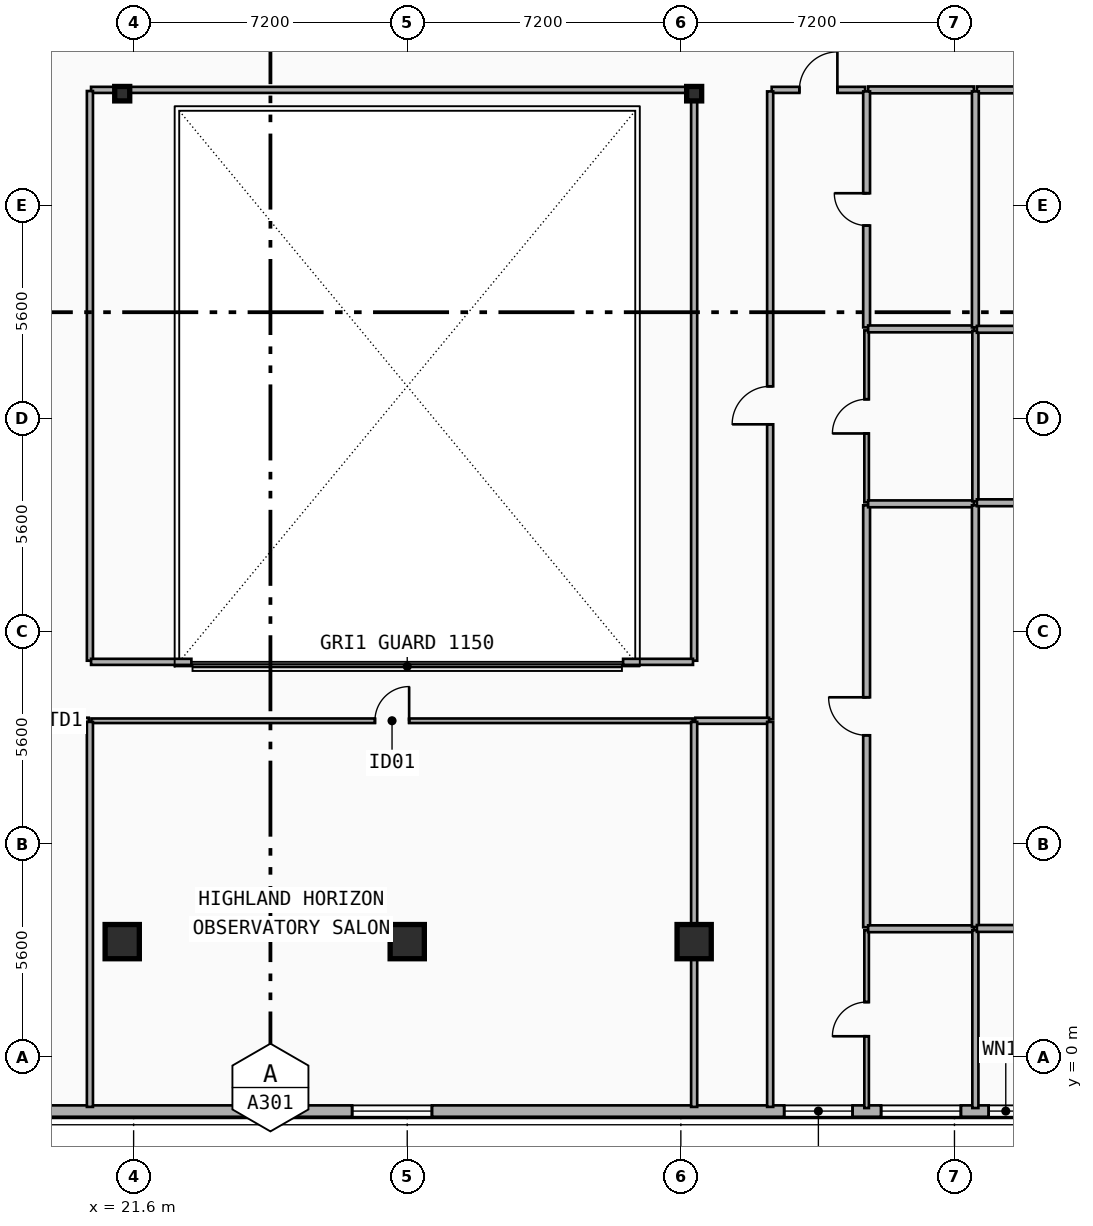
"""IFC4 building model, lengths in metres.
Left out: names, types, materials, properties, quantities, classifications, styles, units other than length and angle.
Written with IfcOpenShell. Run it as: python <this file> out.ifc"""

import sys

from ifc_helpers import new_model, si_unit, direction, frame, frame_2d, origin, origin_2d, place, context, subcontext, project, spatial, rectangle, i_section, extrude, element, fill, save


model = new_model("IFC4")
c1 = context("Model", 3, precision=1e-05, world=origin(), true_north=direction((0.0, 1.0)))
c2 = subcontext(c1, "Body", "Model", "MODEL_VIEW")
j1 = project(units=[si_unit("LENGTHUNIT", "METRE"), si_unit("PLANEANGLEUNIT", "RADIAN")], contexts=[c1])
p1 = place(None, origin())
s1 = spatial("IfcSite", under=j1, at=p1, CompositionType="ELEMENT")
p2 = place(p1, origin())
s2 = spatial("IfcBuilding", under=s1, at=p2, CompositionType="ELEMENT")
p3 = place(p2, frame((0.0, 0.0, 254.7)))
s3 = spatial("IfcBuildingStorey", under=s2, at=p3, CompositionType="ELEMENT", Elevation=254.7)
for number, where, z_axis, x_axis in (
    (1, (21.3, 25.35, 0.0), (0.0, 0.0, 1.0), (1.0, 0.0, 0.0)),
    (2, (36.35, 25.35, 0.0), (0.0, 0.0, 1.0), (1.0, 0.0, 0.0)),
):
    element("IfcColumn", number, at=place(p3, frame(where, z_axis=z_axis, x_axis=x_axis)), inside=s3, PredefinedType="COLUMN", context=c2, shape_type="SweptSolid", body=[
        extrude(i_section(OverallWidth=0.395, OverallDepth=0.38, WebThickness=0.019, FlangeThickness=0.03, FilletRadius=0.015, at=origin_2d()), origin(), (0.0, 0.0, 1.0), 3.7),
    ])
for number, where, z_axis, x_axis in (
    (3, (21.3, 3.147, 0.0), (0.0, -0.09, 0.996), (1.0, 0.0, 0.0)),
    (4, (28.8, 3.147, 0.0), (0.0, -0.09, 0.996), (1.0, 0.0, 0.0)),
    (5, (36.35, 3.147, 0.0), (0.0, -0.09, 0.996), (1.0, 0.0, 0.0)),
):
    element("IfcColumn", number, at=place(p3, frame(where, z_axis=z_axis, x_axis=x_axis)), inside=s3, PredefinedType="COLUMN", context=c2, shape_type="SweptSolid", body=[
        extrude(rectangle(XDim=0.9, YDim=0.9, at=origin_2d()), origin(), (0.0, 0.0, 1.0), 3.715),
    ])
p4 = place(p3, frame((45.2, -1.42, 0.0), z_axis=(0.0, 0.0, 1.0), x_axis=(-1.0, 0.0, 0.0)))
e6 = element("IfcWall", 6, at=p4, inside=s3, PredefinedType="SOLIDWALL", context=c2, shape_type="SweptSolid", body=[
    extrude(rectangle(XDim=32.8, YDim=0.3, at=frame_2d((16.4, 0.0))), origin(), (0.0, 0.0, 1.0), 3.42),
])
p5 = place(p4, frame((26.77, 0.0, 0.75)))
e7 = element("IfcOpeningElement", 7, at=p5, cuts=e6, PredefinedType="OPENING", context=c2, shape_type="SweptSolid", body=[
    extrude(rectangle(XDim=1.6, YDim=1.95, at=frame_2d((0.8, 0.975))), frame((0.0, 0.16, 0.0), z_axis=(0.0, -1.0, 0.0), x_axis=(1.0, 0.0, 0.0)), (0.0, 0.0, 1.0), 0.32),
])
p6 = place(p4, frame((29.115, 0.0, 0.75)))
e8 = element("IfcOpeningElement", 8, at=p6, cuts=e6, PredefinedType="OPENING", context=c2, shape_type="SweptSolid", body=[
    extrude(rectangle(XDim=2.1, YDim=2.1, at=frame_2d((1.05, 1.05))), frame((0.0, 0.16, 0.0), z_axis=(0.0, -1.0, 0.0), x_axis=(1.0, 0.0, 0.0)), (0.0, 0.0, 1.0), 0.32),
])
p7 = place(p4, frame((15.75, 0.0, 0.75)))
e9 = element("IfcOpeningElement", 9, at=p7, cuts=e6, PredefinedType="OPENING", context=c2, shape_type="SweptSolid", body=[
    extrude(rectangle(XDim=2.1, YDim=2.1, at=frame_2d((1.05, 1.05))), frame((0.0, 0.16, 0.0), z_axis=(0.0, -1.0, 0.0), x_axis=(1.0, 0.0, 0.0)), (0.0, 0.0, 1.0), 0.32),
])
p8 = place(p4, frame((4.681, 0.0, 0.8)))
e10 = element("IfcOpeningElement", 10, at=p8, cuts=e6, PredefinedType="OPENING", context=c2, shape_type="SweptSolid", body=[
    extrude(rectangle(XDim=1.8, YDim=1.8, at=frame_2d((0.9, 0.9))), frame((0.0, 0.16, 0.0), z_axis=(0.0, -1.0, 0.0), x_axis=(1.0, 0.0, 0.0)), (0.0, 0.0, 1.0), 0.32),
])
p9 = place(p4, frame((1.831, 0.0, 0.75)))
e11 = element("IfcOpeningElement", 11, at=p9, cuts=e6, PredefinedType="OPENING", context=c2, shape_type="SweptSolid", body=[
    extrude(rectangle(XDim=2.1, YDim=2.1, at=frame_2d((1.05, 1.05))), frame((0.0, 0.16, 0.0), z_axis=(0.0, -1.0, 0.0), x_axis=(1.0, 0.0, 0.0)), (0.0, 0.0, 1.0), 0.32),
])
p10 = place(p4, frame((0.2, 0.0, 0.9)))
e12 = element("IfcOpeningElement", 12, at=p10, cuts=e6, PredefinedType="OPENING", context=c2, shape_type="SweptSolid", body=[
    extrude(rectangle(XDim=0.9, YDim=1.05, at=frame_2d((0.45, 0.525))), frame((0.0, 0.16, 0.0), z_axis=(0.0, -1.0, 0.0), x_axis=(1.0, 0.0, 0.0)), (0.0, 0.0, 1.0), 0.32),
])
p11 = place(p4, frame((31.76, 0.0, 0.9)))
e13 = element("IfcOpeningElement", 13, at=p11, cuts=e6, PredefinedType="OPENING", context=c2, shape_type="SweptSolid", body=[
    extrude(rectangle(XDim=0.9, YDim=1.05, at=frame_2d((0.45, 0.525))), frame((0.0, 0.16, 0.0), z_axis=(0.0, -1.0, 0.0), x_axis=(1.0, 0.0, 0.0)), (0.0, 0.0, 1.0), 0.32),
])
p12 = place(p3, frame((38.39, 25.45, 0.0), z_axis=(0.0, 0.0, 1.0), x_axis=(1.0, 0.0, 0.0)))
e14 = element("IfcWall", 14, at=p12, inside=s3, PredefinedType="PARTITIONING", context=c2, shape_type="SweptSolid", body=[
    extrude(rectangle(XDim=2.458, YDim=0.16, at=frame_2d((1.229, 0.0))), origin(), (0.0, 0.0, 1.0), 3.42),
])
p13 = place(p12, frame((0.729, 0.0, 0.0)))
e15 = element("IfcOpeningElement", 15, at=p13, cuts=e14, PredefinedType="OPENING", context=c2, shape_type="SweptSolid", body=[
    extrude(rectangle(XDim=1.0, YDim=2.15, at=frame_2d((0.5, 1.075))), frame((0.0, 0.09, 0.0), z_axis=(0.0, -1.0, 0.0), x_axis=(1.0, 0.0, 0.0)), (0.0, 0.0, 1.0), 0.18),
])
p14 = place(p3, frame((40.928, 25.45, 0.0), z_axis=(0.0, 0.0, 1.0), x_axis=(1.0, 0.0, 0.0)))
e16 = element("IfcWall", 16, at=p14, inside=s3, PredefinedType="PLUMBINGWALL", context=c2, shape_type="SweptSolid", body=[
    extrude(rectangle(XDim=2.782, YDim=0.18, at=frame_2d((1.391, 0.0))), origin(), (0.0, 0.0, 1.0), 3.42),
])
p15 = place(p3, frame((43.79, 25.45, 0.0), z_axis=(0.0, 0.0, 1.0), x_axis=(1.0, 0.0, 0.0)))
e17 = element("IfcWall", 17, at=p15, inside=s3, PredefinedType="PLUMBINGWALL", context=c2, shape_type="SweptSolid", body=[
    extrude(rectangle(XDim=2.777, YDim=0.18, at=frame_2d((1.388, 0.0))), origin(), (0.0, 0.0, 1.0), 2.7),
])
p16 = place(p3, frame((38.35, 8.89, 0.0), z_axis=(0.0, 0.0, 1.0), x_axis=(0.0, 1.0, 0.0)))
e18 = element("IfcWall", 18, at=p16, inside=s3, PredefinedType="PARTITIONING", context=c2, shape_type="SweptSolid", body=[
    extrude(rectangle(XDim=16.52, YDim=0.16, at=frame_2d((8.26, 0.0))), origin(), (0.0, 0.0, 1.0), 2.9),
])
p17 = place(p16, frame((7.76, 0.0, 0.0)))
e19 = element("IfcOpeningElement", 19, at=p17, cuts=e18, PredefinedType="OPENING", context=c2, shape_type="SweptSolid", body=[
    extrude(rectangle(XDim=1.0, YDim=2.15, at=frame_2d((0.5, 1.075))), frame((0.0, 0.09, 0.0), z_axis=(0.0, -1.0, 0.0), x_axis=(1.0, 0.0, 0.0)), (0.0, 0.0, 1.0), 0.18),
])
p18 = place(p3, frame((20.49, 8.85, 0.0), z_axis=(0.0, 0.0, 1.0), x_axis=(1.0, 0.0, 0.0)))
e20 = element("IfcWall", 20, at=p18, inside=s3, PredefinedType="PARTITIONING", context=c2, shape_type="SweptSolid", body=[
    extrude(rectangle(XDim=15.82, YDim=0.12, at=frame_2d((7.91, 0.0))), origin(), (0.0, 0.0, 1.0), 2.7),
])
p19 = place(p18, frame((7.46, 0.0, 0.0)))
e21 = element("IfcOpeningElement", 21, at=p19, cuts=e20, PredefinedType="OPENING", context=c2, shape_type="SweptSolid", body=[
    extrude(rectangle(XDim=0.9, YDim=2.1, at=frame_2d((0.45, 1.05))), frame((0.0, 0.07, 0.0), z_axis=(0.0, -1.0, 0.0), x_axis=(1.0, 0.0, 0.0)), (0.0, 0.0, 1.0), 0.14),
])
p20 = place(p3, frame((40.888, -1.34, 0.0), z_axis=(0.0, 0.0, 1.0), x_axis=(0.0, 1.0, 0.0)))
e22 = element("IfcWall", 22, at=p20, inside=s3, PredefinedType="PARTITIONING", context=c2, shape_type="SweptSolid", body=[
    extrude(rectangle(XDim=4.677, YDim=0.12, at=frame_2d((2.338, 0.0))), origin(), (0.0, 0.0, 1.0), 3.08),
])
p21 = place(p20, frame((1.888, 0.0, 0.0)))
e23 = element("IfcOpeningElement", 23, at=p21, cuts=e22, PredefinedType="OPENING", context=c2, shape_type="SweptSolid", body=[
    extrude(rectangle(XDim=0.9, YDim=2.1, at=frame_2d((0.45, 1.05))), frame((0.0, 0.07, 0.0), z_axis=(0.0, -1.0, 0.0), x_axis=(1.0, 0.0, 0.0)), (0.0, 0.0, 1.0), 0.14),
])
p22 = place(p3, frame((40.888, 3.417, 0.0), z_axis=(0.0, 0.0, 1.0), x_axis=(0.0, 1.0, 0.0)))
e24 = element("IfcWall", 24, at=p22, inside=s3, PredefinedType="PLUMBINGWALL", context=c2, shape_type="SweptSolid", body=[
    extrude(rectangle(XDim=11.101, YDim=0.18, at=frame_2d((5.551, 0.0))), origin(), (0.0, 0.0, 1.0), 2.9),
])
p23 = place(p22, frame((5.051, 0.0, 0.0)))
e25 = element("IfcOpeningElement", 25, at=p23, cuts=e24, PredefinedType="OPENING", context=c2, shape_type="SweptSolid", body=[
    extrude(rectangle(XDim=1.0, YDim=2.15, at=frame_2d((0.5, 1.075))), frame((0.0, 0.1, 0.0), z_axis=(0.0, -1.0, 0.0), x_axis=(1.0, 0.0, 0.0)), (0.0, 0.0, 1.0), 0.2),
])
p24 = place(p3, frame((40.888, 14.598, 0.0), z_axis=(0.0, 0.0, 1.0), x_axis=(0.0, 1.0, 0.0)))
e26 = element("IfcWall", 26, at=p24, inside=s3, PredefinedType="PARTITIONING", context=c2, shape_type="SweptSolid", body=[
    extrude(rectangle(XDim=4.523, YDim=0.12, at=frame_2d((2.262, 0.0))), origin(), (0.0, 0.0, 1.0), 2.9),
])
p25 = place(p24, frame((1.812, 0.0, 0.0)))
e27 = element("IfcOpeningElement", 27, at=p25, cuts=e26, PredefinedType="OPENING", context=c2, shape_type="SweptSolid", body=[
    extrude(rectangle(XDim=0.9, YDim=2.1, at=frame_2d((0.45, 1.05))), frame((0.0, 0.07, 0.0), z_axis=(0.0, -1.0, 0.0), x_axis=(1.0, 0.0, 0.0)), (0.0, 0.0, 1.0), 0.14),
])
p26 = place(p3, frame((40.888, 19.201, 0.0), z_axis=(0.0, 0.0, 1.0), x_axis=(0.0, 1.0, 0.0)))
e28 = element("IfcWall", 28, at=p26, inside=s3, PredefinedType="PLUMBINGWALL", context=c2, shape_type="SweptSolid", body=[
    extrude(rectangle(XDim=6.209, YDim=0.18, at=frame_2d((3.104, 0.0))), origin(), (0.0, 0.0, 1.0), 2.9),
])
p27 = place(p26, frame((2.679, 0.0, 0.0)))
e29 = element("IfcOpeningElement", 29, at=p27, cuts=e28, PredefinedType="OPENING", context=c2, shape_type="SweptSolid", body=[
    extrude(rectangle(XDim=0.85, YDim=2.1, at=frame_2d((0.425, 1.05))), frame((0.0, 0.1, 0.0), z_axis=(0.0, -1.0, 0.0), x_axis=(1.0, 0.0, 0.0)), (0.0, 0.0, 1.0), 0.2),
])
p28 = place(p3, frame((40.928, 3.377, 0.0), z_axis=(0.0, 0.0, 1.0), x_axis=(1.0, 0.0, 0.0)))
e30 = element("IfcWall", 30, at=p28, inside=s3, PredefinedType="PLUMBINGWALL", context=c2, shape_type="SweptSolid", body=[
    extrude(rectangle(XDim=2.782, YDim=0.18, at=frame_2d((1.391, 0.0))), origin(), (0.0, 0.0, 1.0), 3.08),
])
p29 = place(p3, frame((43.75, -1.34, 0.0), z_axis=(0.0, 0.0, 1.0), x_axis=(0.0, 1.0, 0.0)))
e31 = element("IfcWall", 31, at=p29, inside=s3, PredefinedType="PARTITIONING", context=c2, shape_type="SweptSolid", body=[
    extrude(rectangle(XDim=4.677, YDim=0.16, at=frame_2d((2.338, 0.0))), origin(), (0.0, 0.0, 1.0), 3.08),
])
p30 = place(p3, frame((40.928, 14.558, 0.0), z_axis=(0.0, 0.0, 1.0), x_axis=(1.0, 0.0, 0.0)))
e32 = element("IfcWall", 32, at=p30, inside=s3, PredefinedType="PLUMBINGWALL", context=c2, shape_type="SweptSolid", body=[
    extrude(rectangle(XDim=2.782, YDim=0.18, at=frame_2d((1.391, 0.0))), origin(), (0.0, 0.0, 1.0), 2.9),
])
p31 = place(p3, frame((43.75, 3.425, 0.0), z_axis=(0.0, 0.0, 1.0), x_axis=(0.0, 1.0, 0.0)))
e33 = element("IfcWall", 33, at=p31, inside=s3, PredefinedType="PLUMBINGWALL", context=c2, shape_type="SweptSolid", body=[
    extrude(rectangle(XDim=11.093, YDim=0.18, at=frame_2d((5.546, 0.0))), origin(), (0.0, 0.0, 1.0), 2.9),
])
p32 = place(p3, frame((40.928, 19.161, 0.0), z_axis=(0.0, 0.0, 1.0), x_axis=(1.0, 0.0, 0.0)))
e34 = element("IfcWall", 34, at=p32, inside=s3, PredefinedType="PLUMBINGWALL", context=c2, shape_type="SweptSolid", body=[
    extrude(rectangle(XDim=2.782, YDim=0.18, at=frame_2d((1.391, 0.0))), origin(), (0.0, 0.0, 1.0), 2.91),
])
p33 = place(p3, frame((43.75, 14.626, 0.0), z_axis=(0.0, 0.0, 1.0), x_axis=(0.0, 1.0, 0.0)))
e35 = element("IfcWall", 35, at=p33, inside=s3, PredefinedType="PARTITIONING", context=c2, shape_type="SweptSolid", body=[
    extrude(rectangle(XDim=4.484, YDim=0.16, at=frame_2d((2.242, 0.0))), origin(), (0.0, 0.0, 1.0), 2.9),
])
p34 = place(p3, frame((43.75, 19.201, 0.0), z_axis=(0.0, 0.0, 1.0), x_axis=(0.0, 1.0, 0.0)))
e36 = element("IfcWall", 36, at=p34, inside=s3, PredefinedType="PLUMBINGWALL", context=c2, shape_type="SweptSolid", body=[
    extrude(rectangle(XDim=6.209, YDim=0.18, at=frame_2d((3.104, 0.0))), origin(), (0.0, 0.0, 1.0), 2.9),
])
for number, where, z_axis, x_axis in (
    (37, (43.79, 3.385, 0.0), (0.0, 0.0, 1.0), (1.0, 0.0, 0.0)),
    (38, (43.79, 14.586, 0.0), (0.0, 0.0, 1.0), (1.0, 0.0, 0.0)),
    (39, (43.79, 19.15, 0.0), (0.0, 0.0, 1.0), (1.0, 0.0, 0.0)),
):
    element("IfcWall", number, at=place(p3, frame(where, z_axis=z_axis, x_axis=x_axis)), inside=s3, PredefinedType="PLUMBINGWALL", context=c2, shape_type="SweptSolid", body=[
        extrude(rectangle(XDim=2.777, YDim=0.18, at=frame_2d((1.388, 0.0))), origin(), (0.0, 0.0, 1.0), 2.7),
    ])
p35 = place(p3, frame((20.48, 25.45, 0.0), z_axis=(0.0, 0.0, 1.0), x_axis=(1.0, 0.0, 0.0)))
e40 = element("IfcWall", 40, at=p35, inside=s3, PredefinedType="PARTITIONING", context=c2, shape_type="SweptSolid", body=[
    extrude(rectangle(XDim=15.84, YDim=0.16, at=frame_2d((7.92, 0.0))), origin(), (0.0, 0.0, 1.0), 2.7),
])
p36 = place(p3, frame((18.88, 8.85, 0.0), z_axis=(0.0, 0.0, 1.0), x_axis=(1.0, 0.0, 0.0)))
e41 = element("IfcWall", 41, at=p36, inside=s3, PredefinedType="PARTITIONING", context=c2, shape_type="SweptSolid", body=[
    extrude(rectangle(XDim=1.54, YDim=0.16, at=frame_2d((0.77, 0.0))), origin(), (0.0, 0.0, 1.0), 3.42),
])
p37 = place(p3, frame((20.45, 10.43, 0.0), z_axis=(0.0, 0.0, 1.0), x_axis=(0.0, 1.0, 0.0)))
e42 = element("IfcWall", 42, at=p37, inside=s3, PredefinedType="PARTITIONING", context=c2, shape_type="SweptSolid", body=[
    extrude(rectangle(XDim=14.99, YDim=0.16, at=frame_2d((7.495, 0.0))), origin(), (0.0, 0.0, 1.0), 2.9),
])
p38 = place(p3, frame((36.38, 8.85, 0.0), z_axis=(0.0, 0.0, 1.0), x_axis=(1.0, 0.0, 0.0)))
e43 = element("IfcWall", 43, at=p38, inside=s3, PredefinedType="PARTITIONING", context=c2, shape_type="SweptSolid", body=[
    extrude(rectangle(XDim=1.94, YDim=0.16, at=frame_2d((0.97, 0.0))), origin(), (0.0, 0.0, 1.0), 2.7),
])
p39 = place(p3, frame((36.35, 10.43, 0.0), z_axis=(0.0, 0.0, 1.0), x_axis=(0.0, 1.0, 0.0)))
e44 = element("IfcWall", 44, at=p39, inside=s3, PredefinedType="PARTITIONING", context=c2, shape_type="SweptSolid", body=[
    extrude(rectangle(XDim=14.99, YDim=0.16, at=frame_2d((7.495, 0.0))), origin(), (0.0, 0.0, 1.0), 2.7),
])
p40 = place(p3, frame((20.48, 10.4, 0.0), z_axis=(0.0, 0.0, 1.0), x_axis=(1.0, 0.0, 0.0)))
e45 = element("IfcWall", 45, at=p40, inside=s3, PredefinedType="PARTITIONING", context=c2, shape_type="SweptSolid", body=[
    extrude(rectangle(XDim=2.64, YDim=0.16, at=frame_2d((1.32, 0.0))), origin(), (0.0, 0.0, 1.0), 2.7),
])
p41 = place(p3, frame((34.48, 10.4, 0.0), z_axis=(0.0, 0.0, 1.0), x_axis=(1.0, 0.0, 0.0)))
e46 = element("IfcWall", 46, at=p41, inside=s3, PredefinedType="PARTITIONING", context=c2, shape_type="SweptSolid", body=[
    extrude(rectangle(XDim=1.84, YDim=0.16, at=frame_2d((0.92, 0.0))), origin(), (0.0, 0.0, 1.0), 2.7),
])
p42 = place(p3, frame((20.45, -1.31, 0.0), z_axis=(0.0, 0.0, 1.0), x_axis=(0.0, 1.0, 0.0)))
e47 = element("IfcWall", 47, at=p42, inside=s3, PredefinedType="PARTITIONING", context=c2, shape_type="SweptSolid", body=[
    extrude(rectangle(XDim=10.13, YDim=0.16, at=frame_2d((5.065, 0.0))), origin(), (0.0, 0.0, 1.0), 2.9),
])
p43 = place(p3, frame((36.35, -1.31, 0.0), z_axis=(0.0, 0.0, 1.0), x_axis=(0.0, 1.0, 0.0)))
e48 = element("IfcWall", 48, at=p43, inside=s3, PredefinedType="PARTITIONING", context=c2, shape_type="SweptSolid", body=[
    extrude(rectangle(XDim=10.13, YDim=0.16, at=frame_2d((5.065, 0.0))), origin(), (0.0, 0.0, 1.0), 2.7),
])
p44 = place(p3, frame((38.35, -1.31, 0.0), z_axis=(0.0, 0.0, 1.0), x_axis=(0.0, 1.0, 0.0)))
e49 = element("IfcWall", 49, at=p44, inside=s3, PredefinedType="PARTITIONING", context=c2, shape_type="SweptSolid", body=[
    extrude(rectangle(XDim=10.13, YDim=0.16, at=frame_2d((5.065, 0.0))), origin(), (0.0, 0.0, 1.0), 2.9),
])
p45 = place(p7, origin())
e50 = element("IfcWindow", 50, at=p45, inside=s3, PartitioningType="SINGLE_PANEL", PredefinedType="WINDOW", context=c2, shape_type="SweptSolid", body=[
    extrude(rectangle(XDim=2.1, YDim=2.1, at=frame_2d((1.05, 1.05))), frame((0.0, 0.03, 0.0), z_axis=(0.0, -1.0, 0.0), x_axis=(1.0, 0.0, 0.0)), (0.0, 0.0, 1.0), 0.06),
])
fill(e9, e50)
p46 = place(p8, origin())
e51 = element("IfcWindow", 51, at=p46, inside=s3, PartitioningType="SINGLE_PANEL", PredefinedType="WINDOW", context=c2, shape_type="SweptSolid", body=[
    extrude(rectangle(XDim=1.8, YDim=1.8, at=frame_2d((0.9, 0.9))), frame((0.0, 0.03, 0.0), z_axis=(0.0, -1.0, 0.0), x_axis=(1.0, 0.0, 0.0)), (0.0, 0.0, 1.0), 0.06),
])
fill(e10, e51)
p47 = place(p9, origin())
e52 = element("IfcWindow", 52, at=p47, inside=s3, PartitioningType="SINGLE_PANEL", PredefinedType="WINDOW", context=c2, shape_type="SweptSolid", body=[
    extrude(rectangle(XDim=2.1, YDim=2.1, at=frame_2d((1.05, 1.05))), frame((0.0, 0.03, 0.0), z_axis=(0.0, -1.0, 0.0), x_axis=(1.0, 0.0, 0.0)), (0.0, 0.0, 1.0), 0.06),
])
fill(e11, e52)
p48 = place(p10, origin())
e53 = element("IfcWindow", 53, at=p48, inside=s3, PartitioningType="SINGLE_PANEL", PredefinedType="WINDOW", context=c2, shape_type="SweptSolid", body=[
    extrude(rectangle(XDim=0.9, YDim=1.05, at=frame_2d((0.45, 0.525))), frame((0.0, 0.03, 0.0), z_axis=(0.0, -1.0, 0.0), x_axis=(1.0, 0.0, 0.0)), (0.0, 0.0, 1.0), 0.06),
])
fill(e12, e53)
p49 = place(p13, origin())
e54 = element("IfcDoor", 54, at=p49, inside=s3, OperationType="SINGLE_SWING_RIGHT", PredefinedType="DOOR", context=c2, shape_type="SweptSolid", body=[
    extrude(rectangle(XDim=1.0, YDim=2.15, at=frame_2d((0.5, 1.075))), frame((0.0, 0.025, 0.0), z_axis=(0.0, -1.0, 0.0), x_axis=(1.0, 0.0, 0.0)), (0.0, 0.0, 1.0), 0.05),
])
fill(e15, e54)
p50 = place(p17, origin())
e55 = element("IfcDoor", 55, at=p50, inside=s3, OperationType="SINGLE_SWING_LEFT", PredefinedType="DOOR", context=c2, shape_type="SweptSolid", body=[
    extrude(rectangle(XDim=1.0, YDim=2.15, at=frame_2d((0.5, 1.075))), frame((0.0, 0.025, 0.0), z_axis=(0.0, -1.0, 0.0), x_axis=(1.0, 0.0, 0.0)), (0.0, 0.0, 1.0), 0.05),
])
fill(e19, e55)
p51 = place(p19, origin())
e56 = element("IfcDoor", 56, at=p51, inside=s3, OperationType="SINGLE_SWING_RIGHT", PredefinedType="DOOR", context=c2, shape_type="SweptSolid", body=[
    extrude(rectangle(XDim=0.9, YDim=2.1, at=frame_2d((0.45, 1.05))), frame((0.0, 0.025, 0.0), z_axis=(0.0, -1.0, 0.0), x_axis=(1.0, 0.0, 0.0)), (0.0, 0.0, 1.0), 0.05),
])
fill(e21, e56)
p52 = place(p21, origin())
e57 = element("IfcDoor", 57, at=p52, inside=s3, OperationType="SINGLE_SWING_LEFT", PredefinedType="DOOR", context=c2, shape_type="SweptSolid", body=[
    extrude(rectangle(XDim=0.9, YDim=2.1, at=frame_2d((0.45, 1.05))), frame((0.0, 0.025, 0.0), z_axis=(0.0, -1.0, 0.0), x_axis=(1.0, 0.0, 0.0)), (0.0, 0.0, 1.0), 0.05),
])
fill(e23, e57)
p53 = place(p23, origin())
e58 = element("IfcDoor", 58, at=p53, inside=s3, OperationType="SINGLE_SWING_RIGHT", PredefinedType="DOOR", context=c2, shape_type="SweptSolid", body=[
    extrude(rectangle(XDim=1.0, YDim=2.15, at=frame_2d((0.5, 1.075))), frame((0.0, 0.025, 0.0), z_axis=(0.0, -1.0, 0.0), x_axis=(1.0, 0.0, 0.0)), (0.0, 0.0, 1.0), 0.05),
])
fill(e25, e58)
p54 = place(p25, origin())
e59 = element("IfcDoor", 59, at=p54, inside=s3, OperationType="SINGLE_SWING_LEFT", PredefinedType="DOOR", context=c2, shape_type="SweptSolid", body=[
    extrude(rectangle(XDim=0.9, YDim=2.1, at=frame_2d((0.45, 1.05))), frame((0.0, 0.025, 0.0), z_axis=(0.0, -1.0, 0.0), x_axis=(1.0, 0.0, 0.0)), (0.0, 0.0, 1.0), 0.05),
])
fill(e27, e59)
p55 = place(p27, origin())
e60 = element("IfcDoor", 60, at=p55, inside=s3, OperationType="SINGLE_SWING_RIGHT", PredefinedType="DOOR", context=c2, shape_type="SweptSolid", body=[
    extrude(rectangle(XDim=0.85, YDim=2.1, at=frame_2d((0.425, 1.05))), frame((0.0, 0.025, 0.0), z_axis=(0.0, -1.0, 0.0), x_axis=(1.0, 0.0, 0.0)), (0.0, 0.0, 1.0), 0.05),
])
fill(e29, e60)
save(model, sys.argv[1])
